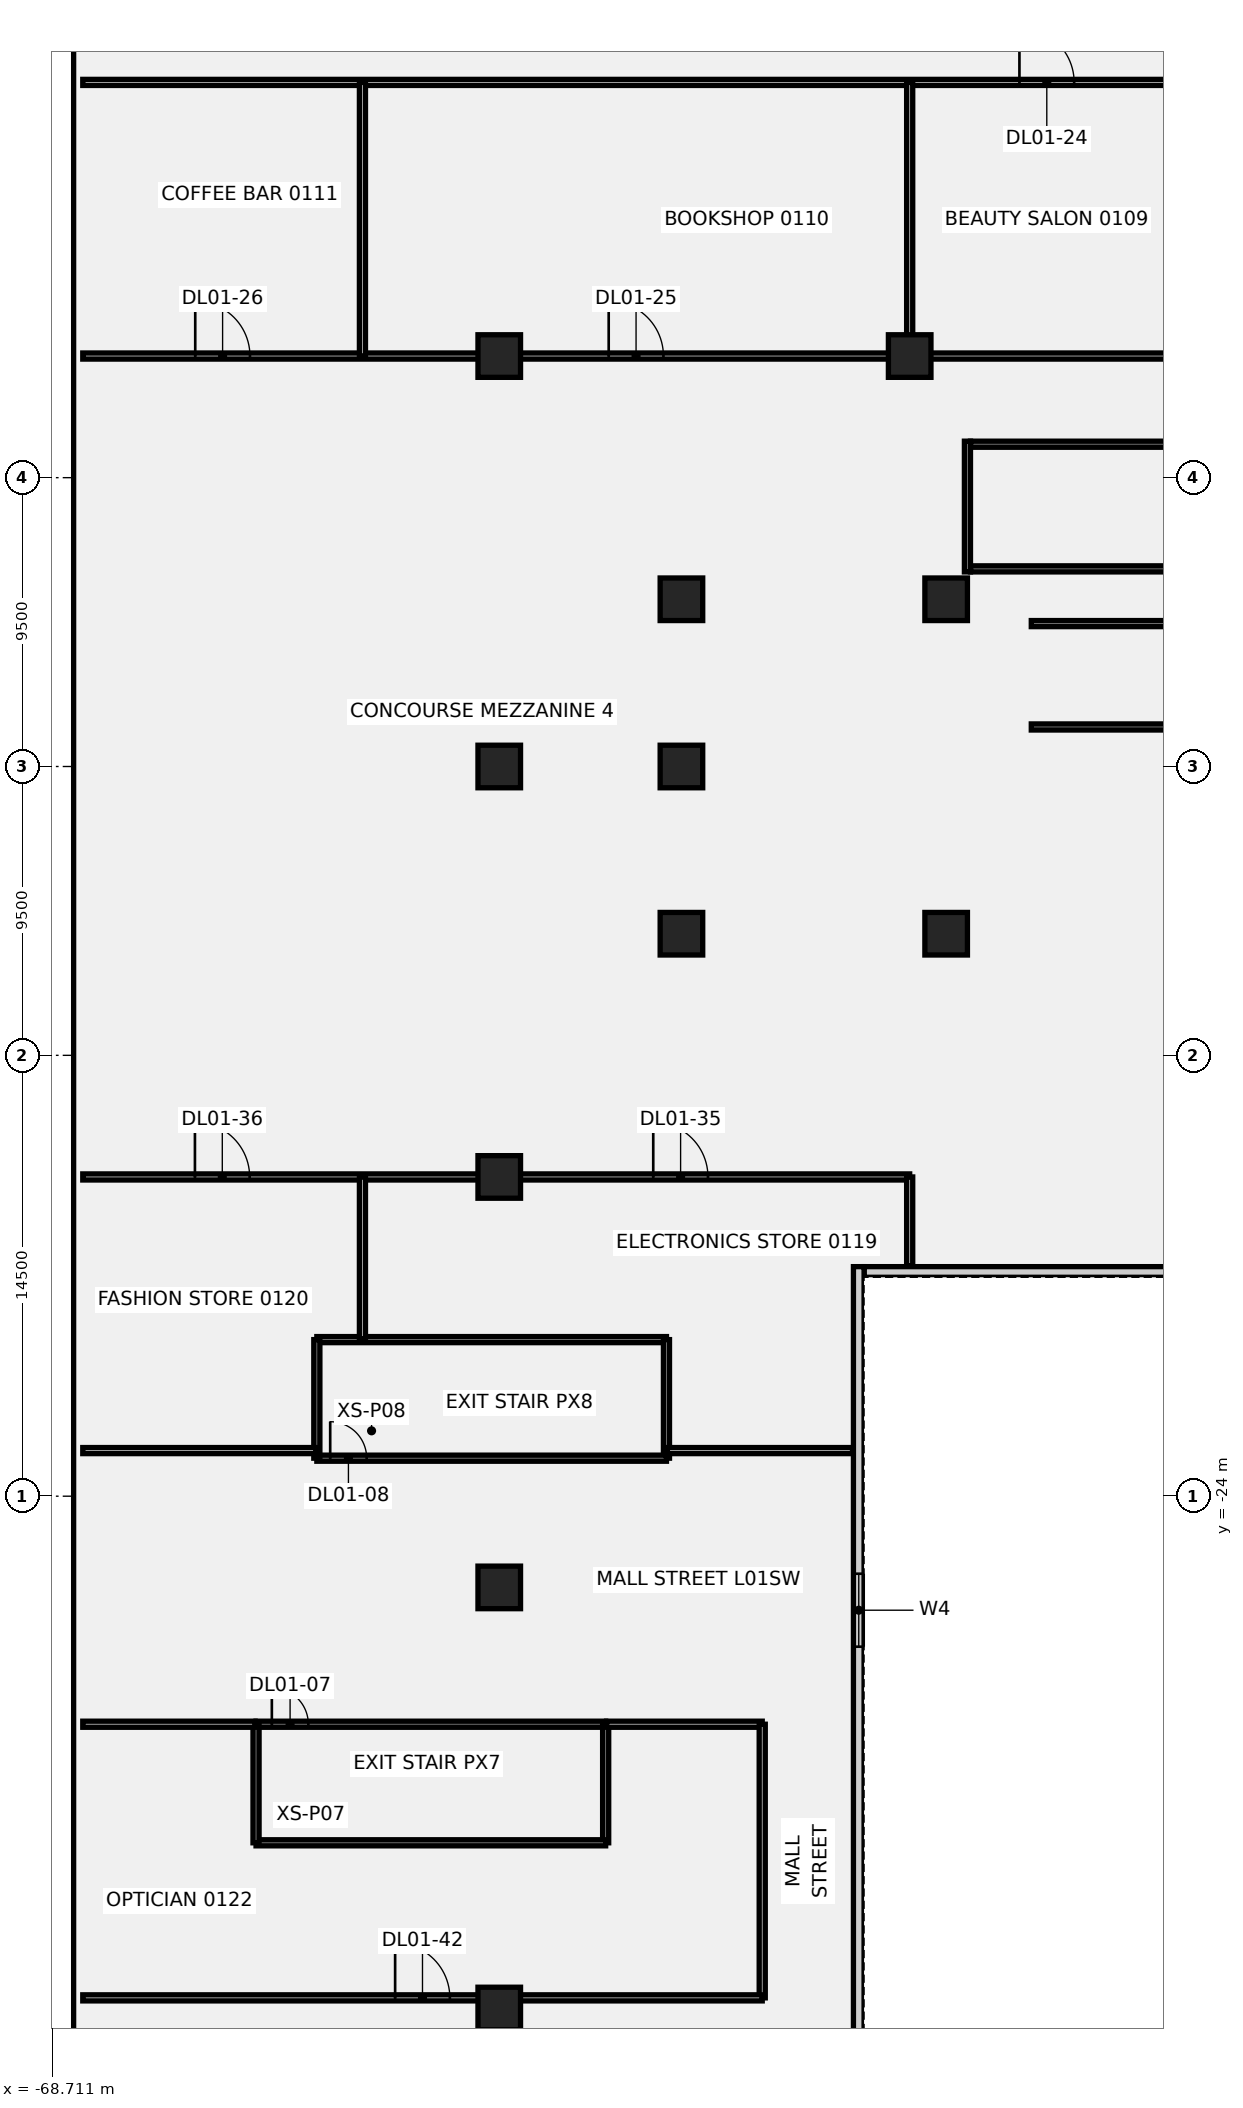
"""IFC4 building model, lengths in metres.
Left out: names, types, materials, properties, quantities, classifications, styles, units other than length and angle.
Written with IfcOpenShell. Run it as: python <this file> out.ifc"""

import sys

from ifc_helpers import new_model, si_unit, direction, frame, frame_2d, origin, origin_2d, place, context, subcontext, project, spatial, polyline, rectangle, outline, extrude, element, fill, save


model = new_model("IFC4")
c1 = context("Model", 3, precision=1e-05, world=origin(), true_north=direction((0.0, 1.0)))
c2 = subcontext(c1, "Body", "Model", "MODEL_VIEW")
j1 = project(units=[si_unit("LENGTHUNIT", "METRE"), si_unit("PLANEANGLEUNIT", "RADIAN")], contexts=[c1])
p1 = place(None, origin())
s1 = spatial("IfcSite", under=j1, at=p1, CompositionType="ELEMENT")
p2 = place(p1, origin())
s2 = spatial("IfcBuilding", under=s1, at=p2, CompositionType="ELEMENT")
p3 = place(p2, frame((0.0, 0.0, 9.0)))
s3 = spatial("IfcBuildingStorey", under=s2, at=p3, CompositionType="ELEMENT", Elevation=9.0)
for number, where, z_axis, x_axis in (
    (1, (-39.3, -5.5, -0.5), (0.0, 0.0, 1.0), (1.0, 0.0, 0.0)),
    (2, (-39.3, 5.5, -0.5), (0.0, 0.0, 1.0), (1.0, 0.0, 0.0)),
    (3, (-48.008, 5.5, -0.5), (0.0, 0.0, 1.0), (1.0, 0.0, 0.0)),
    (4, (-48.008, 0.0, -0.5), (0.0, 0.0, 1.0), (1.0, 0.0, 0.0)),
    (5, (-48.008, -5.5, -0.5), (0.0, 0.0, 1.0), (1.0, 0.0, 0.0)),
    (6, (-54.0, -40.85, -0.5), (0.0, 0.0, 1.0), (1.0, 0.0, 0.0)),
    (7, (-54.0, -27.0, -0.5), (0.0, 0.0, 1.0), (1.0, 0.0, 0.0)),
    (8, (-54.0, -13.5, -0.5), (0.0, 0.0, 1.0), (1.0, 0.0, 0.0)),
    (9, (-54.0, 0.0, -0.5), (0.0, 0.0, 1.0), (1.0, 0.0, 0.0)),
    (10, (-54.0, 13.5, -0.5), (0.0, 0.0, 1.0), (1.0, 0.0, 0.0)),
    (11, (-40.5, 13.5, -0.5), (0.0, 0.0, 1.0), (1.0, 0.0, 0.0)),
):
    element("IfcColumn", number, at=place(p3, frame(where, z_axis=z_axis, x_axis=x_axis)), inside=s3, PredefinedType="COLUMN", context=c2, shape_type="SweptSolid", body=[
        extrude(rectangle(XDim=1.4, YDim=1.4, at=origin_2d()), origin(), (0.0, 0.0, 1.0), 6.0),
    ])
p4 = place(p3, frame((-62.0, -31.5, 0.0), z_axis=(0.0, 0.0, 1.0), x_axis=(1.0, 0.0, 0.0)))
e12 = element("IfcWall", 12, at=p4, inside=s3, PredefinedType="PARTITIONING", context=c2, shape_type="SweptSolid", body=[
    extrude(rectangle(XDim=11.5, YDim=0.2, at=frame_2d((5.75, 0.0))), origin(), (0.0, 0.0, 1.0), 5.5),
])
p5 = place(p4, frame((0.52, 0.0, 0.0)))
e13 = element("IfcOpeningElement", 13, at=p5, cuts=e12, PredefinedType="OPENING", context=c2, shape_type="SweptSolid", body=[
    extrude(rectangle(XDim=1.2, YDim=2.1, at=frame_2d((0.6, 1.05))), frame((0.0, 0.11, 0.0), z_axis=(0.0, -1.0, 0.0), x_axis=(1.0, 0.0, 0.0)), (0.0, 0.0, 1.0), 0.22),
])
p6 = place(p3, frame((-50.5, -35.4, 0.0), z_axis=(0.0, 0.0, 1.0), x_axis=(0.0, 1.0, 0.0)))
e14 = element("IfcWall", 14, at=p6, inside=s3, PredefinedType="PARTITIONING", context=c2, shape_type="SweptSolid", body=[
    extrude(rectangle(XDim=3.9, YDim=0.2, at=frame_2d((1.95, 0.0))), origin(), (0.0, 0.0, 1.0), 5.5),
])
p7 = place(p3, frame((-62.0, -35.4, 0.0), z_axis=(0.0, 0.0, 1.0), x_axis=(1.0, 0.0, 0.0)))
e15 = element("IfcWall", 15, at=p7, inside=s3, PredefinedType="PARTITIONING", context=c2, shape_type="SweptSolid", body=[
    extrude(rectangle(XDim=11.5, YDim=0.2, at=frame_2d((5.75, 0.0))), origin(), (0.0, 0.0, 1.0), 5.5),
])
p8 = place(p3, frame((-62.0, -35.4, 0.0), z_axis=(0.0, 0.0, 1.0), x_axis=(0.0, 1.0, 0.0)))
e16 = element("IfcWall", 16, at=p8, inside=s3, PredefinedType="PARTITIONING", context=c2, shape_type="SweptSolid", body=[
    extrude(rectangle(XDim=3.9, YDim=0.2, at=frame_2d((1.95, 0.0))), origin(), (0.0, 0.0, 1.0), 5.5),
])
p9 = place(p3, frame((-60.0, -18.85, 0.0), z_axis=(0.0, 0.0, 1.0), x_axis=(1.0, 0.0, 0.0)))
e17 = element("IfcWall", 17, at=p9, inside=s3, PredefinedType="PARTITIONING", context=c2, shape_type="SweptSolid", body=[
    extrude(rectangle(XDim=11.5, YDim=0.2, at=frame_2d((5.75, 0.0))), origin(), (0.0, 0.0, 1.0), 5.5),
])
p10 = place(p3, frame((-48.5, -22.75, 0.0), z_axis=(0.0, 0.0, 1.0), x_axis=(0.0, 1.0, 0.0)))
e18 = element("IfcWall", 18, at=p10, inside=s3, PredefinedType="PARTITIONING", context=c2, shape_type="SweptSolid", body=[
    extrude(rectangle(XDim=3.9, YDim=0.2, at=frame_2d((1.95, 0.0))), origin(), (0.0, 0.0, 1.0), 5.5),
])
p11 = place(p3, frame((-60.0, -22.75, 0.0), z_axis=(0.0, 0.0, 1.0), x_axis=(1.0, 0.0, 0.0)))
e19 = element("IfcWall", 19, at=p11, inside=s3, PredefinedType="PARTITIONING", context=c2, shape_type="SweptSolid", body=[
    extrude(rectangle(XDim=11.5, YDim=0.2, at=frame_2d((5.75, 0.0))), origin(), (0.0, 0.0, 1.0), 5.5),
])
p12 = place(p11, frame((0.439, 0.0, 0.0)))
e20 = element("IfcOpeningElement", 20, at=p12, cuts=e19, PredefinedType="OPENING", context=c2, shape_type="SweptSolid", body=[
    extrude(rectangle(XDim=1.2, YDim=2.1, at=frame_2d((0.6, 1.05))), frame((0.0, 0.11, 0.0), z_axis=(0.0, -1.0, 0.0), x_axis=(1.0, 0.0, 0.0)), (0.0, 0.0, 1.0), 0.22),
])
p13 = place(p3, frame((-60.0, -22.75, 0.0), z_axis=(0.0, 0.0, 1.0), x_axis=(0.0, 1.0, 0.0)))
e21 = element("IfcWall", 21, at=p13, inside=s3, PredefinedType="PARTITIONING", context=c2, shape_type="SweptSolid", body=[
    extrude(rectangle(XDim=3.9, YDim=0.2, at=frame_2d((1.95, 0.0))), origin(), (0.0, 0.0, 1.0), 5.5),
])
p14 = place(p3, frame((-50.47, -31.5, 0.0), z_axis=(0.0, 0.0, 1.0), x_axis=(1.0, 0.0, 0.0)))
e22 = element("IfcWall", 22, at=p14, inside=s3, PredefinedType="PARTITIONING", context=c2, shape_type="SweptSolid", body=[
    extrude(rectangle(XDim=5.12, YDim=0.2, at=frame_2d((2.56, 0.0))), origin(), (0.0, 0.0, 1.0), 5.5),
])
p15 = place(p3, frame((-45.35, -40.5, 0.0), z_axis=(0.0, 0.0, 1.0), x_axis=(0.0, 1.0, 0.0)))
e23 = element("IfcWall", 23, at=p15, inside=s3, PredefinedType="PARTITIONING", context=c2, shape_type="SweptSolid", body=[
    extrude(rectangle(XDim=9.0, YDim=0.2, at=frame_2d((4.5, 0.0))), origin(), (0.0, 0.0, 1.0), 5.5),
])
p16 = place(p3, frame((-67.699, -40.5, 0.0), z_axis=(0.0, 0.0, 1.0), x_axis=(1.0, 0.0, 0.0)))
e24 = element("IfcWall", 24, at=p16, inside=s3, PredefinedType="PARTITIONING", context=c2, shape_type="SweptSolid", body=[
    extrude(rectangle(XDim=22.349, YDim=0.2, at=frame_2d((11.174, 0.0))), origin(), (0.0, 0.0, 1.0), 5.5),
])
p17 = place(p16, frame((10.274, 0.0, 0.0)))
e25 = element("IfcOpeningElement", 25, at=p17, cuts=e24, PredefinedType="OPENING", context=c2, shape_type="SweptSolid", body=[
    extrude(rectangle(XDim=1.8, YDim=2.1, at=frame_2d((0.9, 1.05))), frame((0.0, 0.11, 0.0), z_axis=(0.0, -1.0, 0.0), x_axis=(1.0, 0.0, 0.0)), (0.0, 0.0, 1.0), 0.22),
])
p18 = place(p3, frame((-67.699, -31.5, 0.0), z_axis=(0.0, 0.0, 1.0), x_axis=(1.0, 0.0, 0.0)))
e26 = element("IfcWall", 26, at=p18, inside=s3, PredefinedType="PARTITIONING", context=c2, shape_type="SweptSolid", body=[
    extrude(rectangle(XDim=5.669, YDim=0.2, at=frame_2d((2.834, 0.0))), origin(), (0.0, 0.0, 1.0), 5.5),
])
p19 = place(p3, frame((-67.699, -22.5, 0.0), z_axis=(0.0, 0.0, 1.0), x_axis=(1.0, 0.0, 0.0)))
e27 = element("IfcWall", 27, at=p19, inside=s3, PredefinedType="PARTITIONING", context=c2, shape_type="SweptSolid", body=[
    extrude(rectangle(XDim=7.669, YDim=0.2, at=frame_2d((3.834, 0.0))), origin(), (0.0, 0.0, 1.0), 5.5),
])
p20 = place(p3, frame((-67.699, -13.5, 0.0), z_axis=(0.0, 0.0, 1.0), x_axis=(1.0, 0.0, 0.0)))
e28 = element("IfcWall", 28, at=p20, inside=s3, PredefinedType="PARTITIONING", context=c2, shape_type="SweptSolid", body=[
    extrude(rectangle(XDim=27.199, YDim=0.2, at=frame_2d((13.6, 0.0))), origin(), (0.0, 0.0, 1.0), 5.5),
])
p21 = place(p20, frame((18.764, 0.0, 0.0)))
e29 = element("IfcOpeningElement", 29, at=p21, cuts=e28, PredefinedType="OPENING", context=c2, shape_type="SweptSolid", body=[
    extrude(rectangle(XDim=1.8, YDim=2.1, at=frame_2d((0.9, 1.05))), frame((0.0, 0.11, 0.0), z_axis=(0.0, -1.0, 0.0), x_axis=(1.0, 0.0, 0.0)), (0.0, 0.0, 1.0), 0.22),
])
p22 = place(p20, frame((3.689, 0.0, 0.0)))
e30 = element("IfcOpeningElement", 30, at=p22, cuts=e28, PredefinedType="OPENING", context=c2, shape_type="SweptSolid", body=[
    extrude(rectangle(XDim=1.8, YDim=2.1, at=frame_2d((0.9, 1.05))), frame((0.0, 0.11, 0.0), z_axis=(0.0, -1.0, 0.0), x_axis=(1.0, 0.0, 0.0)), (0.0, 0.0, 1.0), 0.22),
])
p23 = place(p3, frame((-67.699, 13.5, 0.0), z_axis=(0.0, 0.0, 1.0), x_axis=(1.0, 0.0, 0.0)))
e31 = element("IfcWall", 31, at=p23, inside=s3, PredefinedType="PARTITIONING", context=c2, shape_type="SweptSolid", body=[
    extrude(rectangle(XDim=45.199, YDim=0.2, at=frame_2d((22.6, 0.0))), origin(), (0.0, 0.0, 1.0), 5.5),
])
p24 = place(p23, frame((17.299, 0.0, 0.0)))
e32 = element("IfcOpeningElement", 32, at=p24, cuts=e31, PredefinedType="OPENING", context=c2, shape_type="SweptSolid", body=[
    extrude(rectangle(XDim=1.8, YDim=2.1, at=frame_2d((0.9, 1.05))), frame((0.0, 0.11, 0.0), z_axis=(0.0, -1.0, 0.0), x_axis=(1.0, 0.0, 0.0)), (0.0, 0.0, 1.0), 0.22),
])
p25 = place(p23, frame((3.699, 0.0, 0.0)))
e33 = element("IfcOpeningElement", 33, at=p25, cuts=e31, PredefinedType="OPENING", context=c2, shape_type="SweptSolid", body=[
    extrude(rectangle(XDim=1.8, YDim=2.1, at=frame_2d((0.9, 1.05))), frame((0.0, 0.11, 0.0), z_axis=(0.0, -1.0, 0.0), x_axis=(1.0, 0.0, 0.0)), (0.0, 0.0, 1.0), 0.22),
])
p26 = place(p3, frame((-67.699, 22.5, 0.0), z_axis=(0.0, 0.0, 1.0), x_axis=(1.0, 0.0, 0.0)))
e34 = element("IfcWall", 34, at=p26, inside=s3, PredefinedType="PARTITIONING", context=c2, shape_type="SweptSolid", body=[
    extrude(rectangle(XDim=45.199, YDim=0.2, at=frame_2d((22.6, 0.0))), origin(), (0.0, 0.0, 1.0), 5.5),
])
p27 = place(p26, frame((30.809, 0.0, 0.0)))
e35 = element("IfcOpeningElement", 35, at=p27, cuts=e34, PredefinedType="OPENING", context=c2, shape_type="SweptSolid", body=[
    extrude(rectangle(XDim=1.8, YDim=2.1, at=frame_2d((0.9, 1.05))), frame((0.0, 0.11, 0.0), z_axis=(0.0, -1.0, 0.0), x_axis=(1.0, 0.0, 0.0)), (0.0, 0.0, 1.0), 0.22),
])
p28 = place(p3, frame((-58.5, -18.82, 0.0), z_axis=(0.0, 0.0, 1.0), x_axis=(0.0, 1.0, 0.0)))
e36 = element("IfcWall", 36, at=p28, inside=s3, PredefinedType="PARTITIONING", context=c2, shape_type="SweptSolid", body=[
    extrude(rectangle(XDim=5.32, YDim=0.2, at=frame_2d((2.66, 0.0))), origin(), (0.0, 0.0, 1.0), 5.5),
])
p29 = place(p3, frame((-40.5, -16.42, 0.0), z_axis=(0.0, 0.0, 1.0), x_axis=(0.0, 1.0, 0.0)))
e37 = element("IfcWall", 37, at=p29, inside=s3, PredefinedType="PARTITIONING", context=c2, shape_type="SweptSolid", body=[
    extrude(rectangle(XDim=2.92, YDim=0.2, at=frame_2d((1.46, 0.0))), origin(), (0.0, 0.0, 1.0), 5.5),
])
p30 = place(p3, frame((-58.5, 13.5, 0.0), z_axis=(0.0, 0.0, 1.0), x_axis=(0.0, 1.0, 0.0)))
e38 = element("IfcWall", 38, at=p30, inside=s3, PredefinedType="PARTITIONING", context=c2, shape_type="SweptSolid", body=[
    extrude(rectangle(XDim=9.0, YDim=0.2, at=frame_2d((4.5, 0.0))), origin(), (0.0, 0.0, 1.0), 5.5),
])
p31 = place(p3, frame((-48.47, -22.5, 0.0), z_axis=(0.0, 0.0, 1.0), x_axis=(1.0, 0.0, 0.0)))
e39 = element("IfcWall", 39, at=p31, inside=s3, PredefinedType="PARTITIONING", context=c2, shape_type="SweptSolid", body=[
    extrude(rectangle(XDim=6.09, YDim=0.2, at=frame_2d((3.045, 0.0))), origin(), (0.0, 0.0, 1.0), 5.5),
])
p32 = place(p3, frame((-40.5, 13.5, 0.0), z_axis=(0.0, 0.0, 1.0), x_axis=(0.0, 1.0, 0.0)))
e40 = element("IfcWall", 40, at=p32, inside=s3, PredefinedType="PARTITIONING", context=c2, shape_type="SweptSolid", body=[
    extrude(rectangle(XDim=9.0, YDim=0.2, at=frame_2d((4.5, 0.0))), origin(), (0.0, 0.0, 1.0), 5.5),
])
for number, where, z_axis, x_axis in (
    (41, (-28.8, 10.6, 0.0), (0.0, 0.0, 1.0), (-1.0, 0.0, 0.0)),
    (42, (-28.8, 6.5, 0.0), (0.0, 0.0, 1.0), (-1.0, 0.0, 0.0)),
):
    element("IfcWall", number, at=place(p3, frame(where, z_axis=z_axis, x_axis=x_axis)), inside=s3, PredefinedType="SOLIDWALL", context=c2, shape_type="SweptSolid", body=[
        extrude(rectangle(XDim=9.7, YDim=0.2, at=frame_2d((4.85, 0.0))), origin(), (0.0, 0.0, 1.0), 5.5),
    ])
p33 = place(p3, frame((-38.6, 10.7, 0.0), z_axis=(0.0, 0.0, 1.0), x_axis=(0.0, -1.0, 0.0)))
e43 = element("IfcWall", 43, at=p33, inside=s3, PredefinedType="SOLIDWALL", context=c2, shape_type="SweptSolid", body=[
    extrude(rectangle(XDim=4.3, YDim=0.2, at=frame_2d((2.15, 0.0))), origin(), (0.0, 0.0, 1.0), 5.5),
])
p34 = place(p3, frame((-42.0, -16.625, 0.0), z_axis=(0.0, 0.0, 1.0), x_axis=(1.0, 0.0, 0.0)))
e44 = element("IfcWall", 44, at=p34, inside=s3, PredefinedType="SOLIDWALL", context=c2, shape_type="SweptSolid", body=[
    extrude(rectangle(XDim=18.0, YDim=0.35, at=frame_2d((9.0, 0.0))), origin(), (0.0, 0.0, 1.0), 5.5),
])
p35 = place(p34, frame((13.95, 0.0, 1.0)))
e45 = element("IfcOpeningElement", 45, at=p35, cuts=e44, PredefinedType="OPENING", context=c2, shape_type="SweptSolid", body=[
    extrude(rectangle(XDim=2.4, YDim=1.8, at=frame_2d((1.2, 0.9))), frame((0.0, 0.185, 0.0), z_axis=(0.0, -1.0, 0.0), x_axis=(1.0, 0.0, 0.0)), (0.0, 0.0, 1.0), 0.37),
])
p36 = place(p3, frame((-42.175, -43.85, 0.0), z_axis=(0.0, 0.0, 1.0), x_axis=(0.0, 1.0, 0.0)))
e46 = element("IfcWall", 46, at=p36, inside=s3, PredefinedType="SOLIDWALL", context=c2, shape_type="SweptSolid", body=[
    extrude(rectangle(XDim=27.4, YDim=0.35, at=frame_2d((13.7, 0.0))), origin(), (0.0, 0.0, 1.0), 5.5),
])
p37 = place(p36, frame((14.9, 0.0, 1.0)))
e47 = element("IfcOpeningElement", 47, at=p37, cuts=e46, PredefinedType="OPENING", context=c2, shape_type="SweptSolid", body=[
    extrude(rectangle(XDim=2.4, YDim=1.8, at=frame_2d((1.2, 0.9))), frame((0.0, 0.185, 0.0), z_axis=(0.0, -1.0, 0.0), x_axis=(1.0, 0.0, 0.0)), (0.0, 0.0, 1.0), 0.37),
])
p38 = place(p3, frame((-29.8, 1.3, 0.0), z_axis=(0.0, 0.0, 1.0), x_axis=(-1.0, 0.0, 0.0)))
e48 = element("IfcWall", 48, at=p38, inside=s3, PredefinedType="SHEAR", context=c2, shape_type="SweptSolid", body=[
    extrude(rectangle(XDim=6.7, YDim=0.2, at=frame_2d((3.35, 0.0))), origin(), (0.0, 0.0, 1.0), 5.5),
])
p39 = place(p38, frame((0.35, 0.0, 0.0)))
e49 = element("IfcOpeningElement", 49, at=p39, cuts=e48, PredefinedType="OPENING", context=c2, shape_type="SweptSolid", body=[
    extrude(rectangle(XDim=1.0, YDim=2.1, at=frame_2d((0.5, 1.05))), frame((0.0, 0.11, 0.0), z_axis=(0.0, -1.0, 0.0), x_axis=(1.0, 0.0, 0.0)), (0.0, 0.0, 1.0), 0.22),
])
p40 = place(p3, frame((-29.8, 4.7, 0.0), z_axis=(0.0, 0.0, 1.0), x_axis=(-1.0, 0.0, 0.0)))
e50 = element("IfcWall", 50, at=p40, inside=s3, PredefinedType="SHEAR", context=c2, shape_type="SweptSolid", body=[
    extrude(rectangle(XDim=6.7, YDim=0.2, at=frame_2d((3.35, 0.0))), origin(), (0.0, 0.0, 1.0), 5.5),
])
p41 = place(p3, origin())
e51 = element("IfcWall", 51, at=p41, inside=s3, PredefinedType="SHEAR", context=c2, shape_type="SweptSolid", body=[
    extrude(outline(polyline([(-36.3, 4.6), (-36.5, 4.6), (-36.5, 1.4), (-36.3, 1.4), (-36.3, 4.6)])), origin(), (0.0, 0.0, 1.0), 5.5),
])
p42 = place(p5, origin())
e52 = element("IfcDoor", 52, at=p42, inside=s3, OperationType="SINGLE_SWING_LEFT", PredefinedType="DOOR", context=c2, shape_type="SweptSolid", body=[
    extrude(rectangle(XDim=1.2, YDim=2.1, at=frame_2d((0.6, 1.05))), frame((0.0, 0.025, 0.0), z_axis=(0.0, -1.0, 0.0), x_axis=(1.0, 0.0, 0.0)), (0.0, 0.0, 1.0), 0.05),
])
fill(e13, e52)
p43 = place(p12, origin())
e53 = element("IfcDoor", 53, at=p43, inside=s3, OperationType="SINGLE_SWING_RIGHT", PredefinedType="DOOR", context=c2, shape_type="SweptSolid", body=[
    extrude(rectangle(XDim=1.2, YDim=2.1, at=frame_2d((0.6, 1.05))), frame((0.0, 0.025, 0.0), z_axis=(0.0, -1.0, 0.0), x_axis=(1.0, 0.0, 0.0)), (0.0, 0.0, 1.0), 0.05),
])
fill(e20, e53)
p44 = place(p27, origin())
e54 = element("IfcDoor", 54, at=p44, inside=s3, OperationType="SINGLE_SWING_RIGHT", PredefinedType="DOOR", context=c2, shape_type="SweptSolid", body=[
    extrude(rectangle(XDim=1.8, YDim=2.1, at=frame_2d((0.9, 1.05))), frame((0.0, 0.025, 0.0), z_axis=(0.0, -1.0, 0.0), x_axis=(1.0, 0.0, 0.0)), (0.0, 0.0, 1.0), 0.05),
])
fill(e35, e54)
p45 = place(p24, origin())
e55 = element("IfcDoor", 55, at=p45, inside=s3, OperationType="SINGLE_SWING_LEFT", PredefinedType="DOOR", context=c2, shape_type="SweptSolid", body=[
    extrude(rectangle(XDim=1.8, YDim=2.1, at=frame_2d((0.9, 1.05))), frame((0.0, 0.025, 0.0), z_axis=(0.0, -1.0, 0.0), x_axis=(1.0, 0.0, 0.0)), (0.0, 0.0, 1.0), 0.05),
])
fill(e32, e55)
p46 = place(p25, origin())
e56 = element("IfcDoor", 56, at=p46, inside=s3, OperationType="SINGLE_SWING_RIGHT", PredefinedType="DOOR", context=c2, shape_type="SweptSolid", body=[
    extrude(rectangle(XDim=1.8, YDim=2.1, at=frame_2d((0.9, 1.05))), frame((0.0, 0.025, 0.0), z_axis=(0.0, -1.0, 0.0), x_axis=(1.0, 0.0, 0.0)), (0.0, 0.0, 1.0), 0.05),
])
fill(e33, e56)
p47 = place(p21, origin())
e57 = element("IfcDoor", 57, at=p47, inside=s3, OperationType="SINGLE_SWING_LEFT", PredefinedType="DOOR", context=c2, shape_type="SweptSolid", body=[
    extrude(rectangle(XDim=1.8, YDim=2.1, at=frame_2d((0.9, 1.05))), frame((0.0, 0.025, 0.0), z_axis=(0.0, -1.0, 0.0), x_axis=(1.0, 0.0, 0.0)), (0.0, 0.0, 1.0), 0.05),
])
fill(e29, e57)
p48 = place(p22, origin())
e58 = element("IfcDoor", 58, at=p48, inside=s3, OperationType="SINGLE_SWING_RIGHT", PredefinedType="DOOR", context=c2, shape_type="SweptSolid", body=[
    extrude(rectangle(XDim=1.8, YDim=2.1, at=frame_2d((0.9, 1.05))), frame((0.0, 0.025, 0.0), z_axis=(0.0, -1.0, 0.0), x_axis=(1.0, 0.0, 0.0)), (0.0, 0.0, 1.0), 0.05),
])
fill(e30, e58)
p49 = place(p17, origin())
e59 = element("IfcDoor", 59, at=p49, inside=s3, OperationType="SINGLE_SWING_RIGHT", PredefinedType="DOOR", context=c2, shape_type="SweptSolid", body=[
    extrude(rectangle(XDim=1.8, YDim=2.1, at=frame_2d((0.9, 1.05))), frame((0.0, 0.025, 0.0), z_axis=(0.0, -1.0, 0.0), x_axis=(1.0, 0.0, 0.0)), (0.0, 0.0, 1.0), 0.05),
])
fill(e25, e59)
p50 = place(p37, origin())
e60 = element("IfcWindow", 60, at=p50, inside=s3, PartitioningType="SINGLE_PANEL", PredefinedType="WINDOW", context=c2, shape_type="SweptSolid", body=[
    extrude(rectangle(XDim=2.4, YDim=1.8, at=frame_2d((1.2, 0.9))), frame((0.0, 0.03, 0.0), z_axis=(0.0, -1.0, 0.0), x_axis=(1.0, 0.0, 0.0)), (0.0, 0.0, 1.0), 0.06),
])
fill(e47, e60)
save(model, sys.argv[1])
